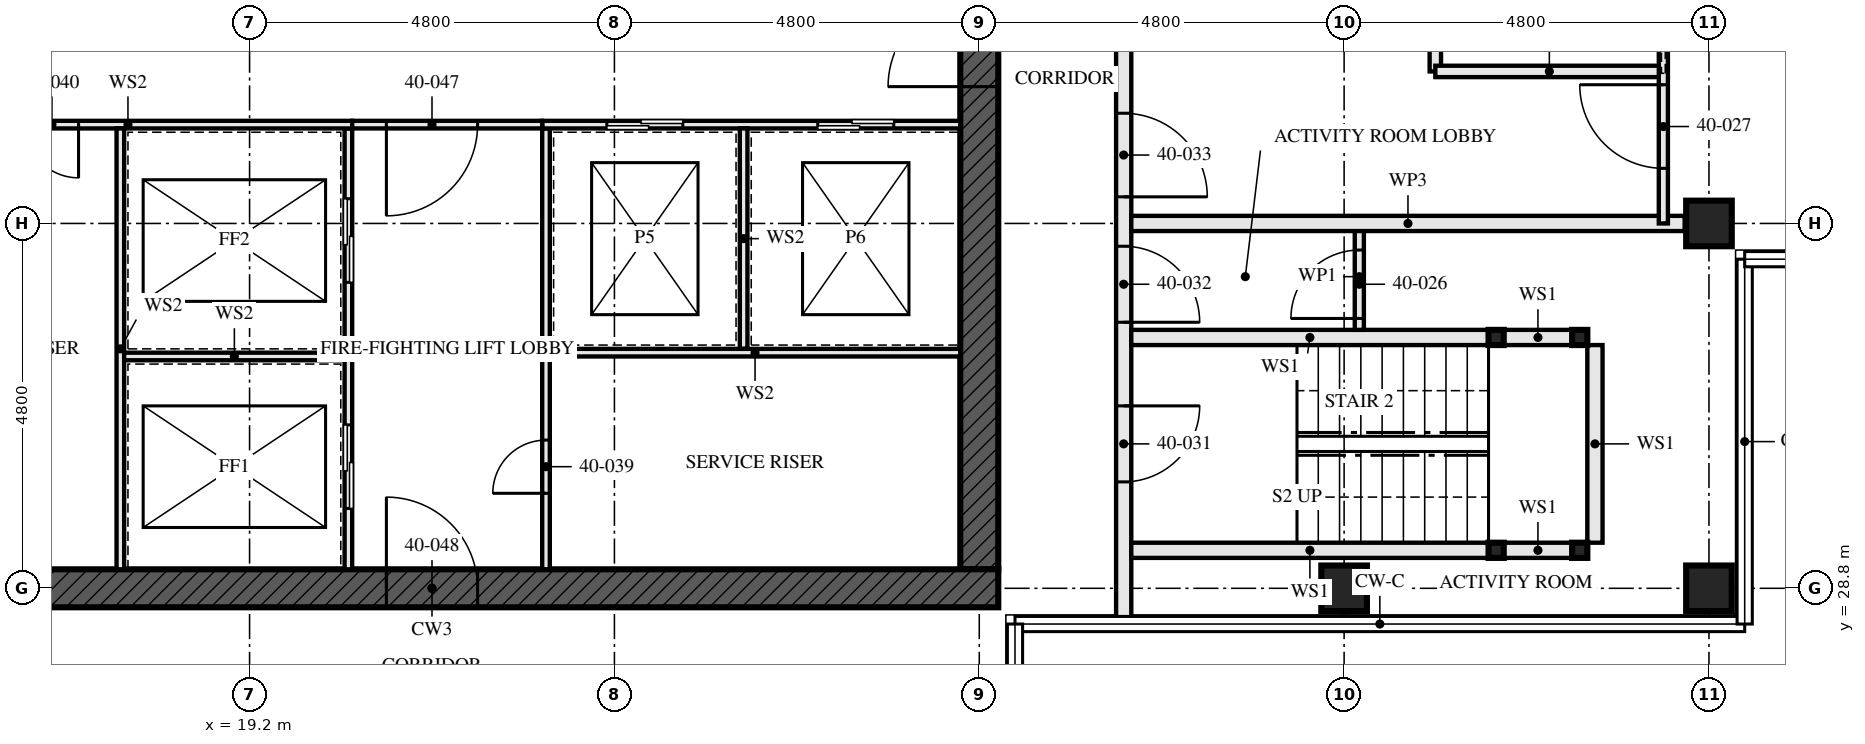
"""IFC4 building model, lengths in metres.
Left out: names, types, materials, properties, quantities, classifications, styles, units other than length and angle.
Written with IfcOpenShell. Run it as: python <this file> out.ifc"""

import sys

from ifc_helpers import new_model, si_unit, direction, frame, frame_2d, origin, origin_2d, place, context, subcontext, project, spatial, rectangle, hollow_rectangle, extrude, element, fill, save


model = new_model("IFC4")
c1 = context("Model", 3, precision=1e-05, world=origin(), true_north=direction((0.0, 1.0)))
c2 = subcontext(c1, "Body", "Model", "MODEL_VIEW")
j1 = project(units=[si_unit("LENGTHUNIT", "METRE"), si_unit("PLANEANGLEUNIT", "RADIAN")], contexts=[c1])
p1 = place(None, origin())
s1 = spatial("IfcSite", under=j1, at=p1, CompositionType="ELEMENT")
p2 = place(p1, origin())
s2 = spatial("IfcBuilding", under=s1, at=p2, CompositionType="ELEMENT")
p3 = place(p2, frame((0.0, 0.0, 148.0)))
s3 = spatial("IfcBuildingStorey", under=s2, at=p3, CompositionType="ELEMENT", Elevation=148.0)
for number, where, z_axis, x_axis in (
    (1, (33.6, 28.8, 0.0), (0.0, 0.0, 1.0), (0.0, 1.0, 0.0)),
    (2, (38.4, 28.8, 0.0), (0.0, 0.0, 1.0), (0.0, 1.0, 0.0)),
    (3, (38.4, 33.6, 0.0), (0.0, 0.0, 1.0), (0.0, 1.0, 0.0)),
):
    element("IfcColumn", number, at=place(p3, frame(where, z_axis=z_axis, x_axis=x_axis)), inside=s3, PredefinedType="COLUMN", context=c2, shape_type="SweptSolid", body=[
        extrude(hollow_rectangle(XDim=0.6, YDim=0.6, WallThickness=0.08, at=origin_2d()), origin(), (0.0, 0.0, 1.0), 3.5),
    ])
p4 = place(p3, frame((14.15, 28.8, -0.17), z_axis=(0.0, 0.0, 1.0), x_axis=(1.0, 0.0, 0.0)))
e4 = element("IfcWall", 4, at=p4, inside=s3, PredefinedType="SHEAR", context=c2, shape_type="SweptSolid", body=[
    extrude(rectangle(XDim=14.9, YDim=0.5, at=frame_2d((7.45, 0.0))), origin(), (0.0, 0.0, 1.0), 3.5),
])
p5 = place(p4, frame((6.85, 0.0, 0.17)))
e5 = element("IfcOpeningElement", 5, at=p5, cuts=e4, PredefinedType="OPENING", context=c2, shape_type="SweptSolid", body=[
    extrude(rectangle(XDim=1.2, YDim=2.1, at=frame_2d((0.6, 1.05))), frame((0.0, 0.26, 0.0), z_axis=(0.0, -1.0, 0.0), x_axis=(1.0, 0.0, 0.0)), (0.0, 0.0, 1.0), 0.521),
])
p6 = place(p3, frame((28.8, 29.05, -0.17), z_axis=(0.0, 0.0, 1.0), x_axis=(0.0, 1.0, 0.0)))
e6 = element("IfcWall", 6, at=p6, inside=s3, PredefinedType="SHEAR", context=c2, shape_type="SweptSolid", body=[
    extrude(rectangle(XDim=13.9, YDim=0.5, at=frame_2d((6.95, 0.0))), origin(), (0.0, 0.0, 1.0), 3.5),
])
p7 = place(p6, frame((6.35, 0.0, 0.17)))
e7 = element("IfcOpeningElement", 7, at=p7, cuts=e6, PredefinedType="OPENING", context=c2, shape_type="SweptSolid", body=[
    extrude(rectangle(XDim=1.2, YDim=2.1, at=frame_2d((0.6, 1.05))), frame((0.0, 0.26, 0.0), z_axis=(0.0, -1.0, 0.0), x_axis=(1.0, 0.0, 0.0)), (0.0, 0.0, 1.0), 0.521),
])
for number, where, z_axis, x_axis in (
    (8, (36.7, 29.3, 0.0), (0.0, 0.0, 1.0), (1.0, 0.0, 0.0)),
    (9, (36.7, 32.1, 0.0), (0.0, 0.0, 1.0), (1.0, 0.0, 0.0)),
    (10, (35.6, 29.3, 0.0), (0.0, 0.0, 1.0), (1.0, 0.0, 0.0)),
    (11, (35.6, 32.1, 0.0), (0.0, 0.0, 1.0), (1.0, 0.0, 0.0)),
):
    element("IfcColumn", number, at=place(p3, frame(where, z_axis=z_axis, x_axis=x_axis)), inside=s3, PredefinedType="COLUMN", context=c2, shape_type="SweptSolid", body=[
        extrude(hollow_rectangle(XDim=0.2, YDim=0.2, WallThickness=0.008, at=origin_2d()), origin(), (0.0, 0.0, 1.0), 3.33),
    ])
p8 = place(p3, frame((36.6, 29.3, 0.0), z_axis=(0.0, 0.0, 1.0), x_axis=(-1.0, 0.0, 0.0)))
e12 = element("IfcWall", 12, at=p8, inside=s3, PredefinedType="SOLIDWALL", context=c2, shape_type="SweptSolid", body=[
    extrude(rectangle(XDim=0.9, YDim=0.2, at=frame_2d((0.45, 0.0))), origin(), (0.0, 0.0, 1.0), 2.99),
])
p9 = place(p3, frame((35.5, 29.3, 0.0), z_axis=(0.0, 0.0, 1.0), x_axis=(-1.0, 0.0, 0.0)))
e13 = element("IfcWall", 13, at=p9, inside=s3, PredefinedType="SOLIDWALL", context=c2, shape_type="SweptSolid", body=[
    extrude(rectangle(XDim=4.7, YDim=0.2, at=frame_2d((2.35, 0.0))), origin(), (0.0, 0.0, 1.0), 2.99),
])
p10 = place(p3, frame((36.6, 32.1, 0.0), z_axis=(0.0, 0.0, 1.0), x_axis=(-1.0, 0.0, 0.0)))
e14 = element("IfcWall", 14, at=p10, inside=s3, PredefinedType="SOLIDWALL", context=c2, shape_type="SweptSolid", body=[
    extrude(rectangle(XDim=0.9, YDim=0.2, at=frame_2d((0.45, 0.0))), origin(), (0.0, 0.0, 1.0), 2.99),
])
p11 = place(p3, frame((35.5, 32.1, 0.0), z_axis=(0.0, 0.0, 1.0), x_axis=(-1.0, 0.0, 0.0)))
e15 = element("IfcWall", 15, at=p11, inside=s3, PredefinedType="SOLIDWALL", context=c2, shape_type="SweptSolid", body=[
    extrude(rectangle(XDim=4.7, YDim=0.2, at=frame_2d((2.35, 0.0))), origin(), (0.0, 0.0, 1.0), 2.99),
])
p12 = place(p3, frame((36.9, 29.4, 0.0), z_axis=(0.0, 0.0, 1.0), x_axis=(0.0, 1.0, 0.0)))
e16 = element("IfcWall", 16, at=p12, inside=s3, PredefinedType="SOLIDWALL", context=c2, shape_type="SweptSolid", body=[
    extrude(rectangle(XDim=2.6, YDim=0.2, at=frame_2d((1.3, 0.0))), origin(), (0.0, 0.0, 1.0), 3.33),
])
p13 = place(p3, frame((33.8, 32.2, 0.0), z_axis=(0.0, 0.0, 1.0), x_axis=(0.0, 1.0, 0.0)))
e17 = element("IfcWall", 17, at=p13, inside=s3, PredefinedType="PARTITIONING", context=c2, shape_type="SweptSolid", body=[
    extrude(rectangle(XDim=1.4, YDim=0.12, at=frame_2d((0.7, 0.0))), origin(), (0.0, 0.0, 1.0), 3.33),
])
p14 = place(p13, frame((0.15, 0.0, 0.0)))
e18 = element("IfcOpeningElement", 18, at=p14, cuts=e17, PredefinedType="OPENING", context=c2, shape_type="SweptSolid", body=[
    extrude(rectangle(XDim=0.9, YDim=2.1, at=frame_2d((0.45, 1.05))), frame((0.0, 0.071, 0.0), z_axis=(0.0, -1.0, 0.0), x_axis=(1.0, 0.0, 0.0)), (0.0, 0.0, 1.0), 0.141),
])
p15 = place(p3, frame((38.08, 33.6, 0.0), z_axis=(0.0, 0.0, 1.0), x_axis=(-1.0, 0.0, 0.0)))
e19 = element("IfcWall", 19, at=p15, inside=s3, PredefinedType="PARTITIONING", context=c2, shape_type="SweptSolid", body=[
    extrude(rectangle(XDim=7.28, YDim=0.2, at=frame_2d((3.64, 0.0))), origin(), (0.0, 0.0, 1.0), 2.55),
])
p16 = place(p3, frame((37.8, 35.6, 0.0), z_axis=(0.0, 0.0, 1.0), x_axis=(-1.0, 0.0, 0.0)))
e20 = element("IfcWall", 20, at=p16, inside=s3, PredefinedType="PARTITIONING", context=c2, shape_type="SweptSolid", body=[
    extrude(rectangle(XDim=3.0, YDim=0.15, at=frame_2d((1.5, 0.0))), origin(), (0.0, 0.0, 1.0), 3.33),
])
p17 = place(p3, frame((34.8, 35.6, 0.0), z_axis=(0.0, 0.0, 1.0), x_axis=(0.0, 1.0, 0.0)))
e21 = element("IfcWall", 21, at=p17, inside=s3, PredefinedType="PARTITIONING", context=c2, shape_type="SweptSolid", body=[
    extrude(rectangle(XDim=2.8, YDim=0.15, at=frame_2d((1.4, 0.0))), origin(), (0.0, 0.0, 1.0), 3.33),
])
p18 = place(p3, frame((37.8, 33.6, 0.0), z_axis=(0.0, 0.0, 1.0), x_axis=(0.0, 1.0, 0.0)))
e22 = element("IfcWall", 22, at=p18, inside=s3, PredefinedType="PARTITIONING", context=c2, shape_type="SweptSolid", body=[
    extrude(rectangle(XDim=4.8, YDim=0.12, at=frame_2d((2.4, 0.0))), origin(), (0.0, 0.0, 1.0), 3.33),
])
p19 = place(p18, frame((0.725, 0.0, 0.0)))
e23 = element("IfcOpeningElement", 23, at=p19, cuts=e22, PredefinedType="OPENING", context=c2, shape_type="SweptSolid", body=[
    extrude(rectangle(XDim=1.1, YDim=2.1, at=frame_2d((0.55, 1.05))), frame((0.0, 0.071, 0.0), z_axis=(0.0, -1.0, 0.0), x_axis=(1.0, 0.0, 0.0)), (0.0, 0.0, 1.0), 0.141),
])
p20 = place(p18, frame((2.925, 0.0, 0.0)))
e24 = element("IfcOpeningElement", 24, at=p20, cuts=e22, PredefinedType="OPENING", context=c2, shape_type="SweptSolid", body=[
    extrude(rectangle(XDim=0.95, YDim=2.1, at=frame_2d((0.475, 1.05))), frame((0.0, 0.071, 0.0), z_axis=(0.0, -1.0, 0.0), x_axis=(1.0, 0.0, 0.0)), (0.0, 0.0, 1.0), 0.141),
])
p21 = place(p3, frame((30.7, 28.35, 0.0), z_axis=(0.0, 0.0, 1.0), x_axis=(0.0, 1.0, 0.0)))
e25 = element("IfcWall", 25, at=p21, inside=s3, PredefinedType="PARTITIONING", context=c2, shape_type="SweptSolid", body=[
    extrude(rectangle(XDim=15.3, YDim=0.2, at=frame_2d((7.65, 0.0))), origin(), (0.0, 0.0, 1.0), 2.32),
])
p22 = place(p21, frame((1.85, 0.0, 0.0)))
e26 = element("IfcOpeningElement", 26, at=p22, cuts=e25, PredefinedType="OPENING", context=c2, shape_type="SweptSolid", body=[
    extrude(rectangle(XDim=1.0, YDim=2.1, at=frame_2d((0.5, 1.05))), frame((0.0, 0.111, 0.0), z_axis=(0.0, -1.0, 0.0), x_axis=(1.0, 0.0, 0.0)), (0.0, 0.0, 1.0), 0.221),
])
p23 = place(p21, frame((3.95, 0.0, 0.0)))
e27 = element("IfcOpeningElement", 27, at=p23, cuts=e25, PredefinedType="OPENING", context=c2, shape_type="SweptSolid", body=[
    extrude(rectangle(XDim=1.0, YDim=2.1, at=frame_2d((0.5, 1.05))), frame((0.0, 0.111, 0.0), z_axis=(0.0, -1.0, 0.0), x_axis=(1.0, 0.0, 0.0)), (0.0, 0.0, 1.0), 0.221),
])
p24 = place(p21, frame((5.6, 0.0, 0.0)))
e28 = element("IfcOpeningElement", 28, at=p24, cuts=e25, PredefinedType="OPENING", context=c2, shape_type="SweptSolid", body=[
    extrude(rectangle(XDim=1.1, YDim=2.1, at=frame_2d((0.55, 1.05))), frame((0.0, 0.111, 0.0), z_axis=(0.0, -1.0, 0.0), x_axis=(1.0, 0.0, 0.0)), (0.0, 0.0, 1.0), 0.221),
])
p25 = place(p21, frame((13.4, 0.0, 0.0)))
e29 = element("IfcOpeningElement", 29, at=p25, cuts=e25, PredefinedType="OPENING", context=c2, shape_type="SweptSolid", body=[
    extrude(rectangle(XDim=1.1, YDim=2.1, at=frame_2d((0.55, 1.05))), frame((0.0, 0.111, 0.0), z_axis=(0.0, -1.0, 0.0), x_axis=(1.0, 0.0, 0.0)), (0.0, 0.0, 1.0), 0.221),
])
p26 = place(p3, frame((20.5, 29.05, 0.0), z_axis=(0.0, 0.0, 1.0), x_axis=(0.0, 1.0, 0.0)))
e30 = element("IfcWall", 30, at=p26, inside=s3, PredefinedType="SOLIDWALL", context=c2, shape_type="SweptSolid", body=[
    extrude(rectangle(XDim=5.8, YDim=0.1, at=frame_2d((2.9, 0.0))), origin(), (0.0, 0.0, 1.0), 3.33),
])
p27 = place(p26, frame((0.8, 0.0, 0.0)))
e31 = element("IfcOpeningElement", 31, at=p27, cuts=e30, PredefinedType="OPENING", context=c2, shape_type="SweptSolid", body=[
    extrude(rectangle(XDim=1.1, YDim=2.3, at=frame_2d((0.55, 1.15))), frame((0.0, 0.061, 0.0), z_axis=(0.0, -1.0, 0.0), x_axis=(1.0, 0.0, 0.0)), (0.0, 0.0, 1.0), 0.121),
])
p28 = place(p26, frame((3.775, 0.0, 0.0)))
e32 = element("IfcOpeningElement", 32, at=p28, cuts=e30, PredefinedType="OPENING", context=c2, shape_type="SweptSolid", body=[
    extrude(rectangle(XDim=1.1, YDim=2.3, at=frame_2d((0.55, 1.15))), frame((0.0, 0.061, 0.0), z_axis=(0.0, -1.0, 0.0), x_axis=(1.0, 0.0, 0.0)), (0.0, 0.0, 1.0), 0.121),
])
p29 = place(p3, frame((23.1, 29.05, 0.0), z_axis=(0.0, 0.0, 1.0), x_axis=(0.0, 1.0, 0.0)))
e33 = element("IfcWall", 33, at=p29, inside=s3, PredefinedType="SOLIDWALL", context=c2, shape_type="SweptSolid", body=[
    extrude(rectangle(XDim=5.8, YDim=0.1, at=frame_2d((2.9, 0.0))), origin(), (0.0, 0.0, 1.0), 3.33),
])
p30 = place(p29, frame((1.0, 0.0, 0.0)))
e34 = element("IfcOpeningElement", 34, at=p30, cuts=e33, PredefinedType="OPENING", context=c2, shape_type="SweptSolid", body=[
    extrude(rectangle(XDim=0.7, YDim=2.1, at=frame_2d((0.35, 1.05))), frame((0.0, 0.061, 0.0), z_axis=(0.0, -1.0, 0.0), x_axis=(1.0, 0.0, 0.0)), (0.0, 0.0, 1.0), 0.121),
])
p31 = place(p3, frame((14.65, 34.9, 0.0), z_axis=(0.0, 0.0, 1.0), x_axis=(1.0, 0.0, 0.0)))
e35 = element("IfcWall", 35, at=p31, inside=s3, PredefinedType="SOLIDWALL", context=c2, shape_type="SweptSolid", body=[
    extrude(rectangle(XDim=5.9, YDim=0.1, at=frame_2d((2.95, 0.0))), origin(), (0.0, 0.0, 1.0), 3.33),
])
p32 = place(p31, frame((1.6, 0.0, 0.0)))
e36 = element("IfcOpeningElement", 36, at=p32, cuts=e35, PredefinedType="OPENING", context=c2, shape_type="SweptSolid", body=[
    extrude(rectangle(XDim=0.7, YDim=2.1, at=frame_2d((0.35, 1.05))), frame((0.0, 0.061, 0.0), z_axis=(0.0, -1.0, 0.0), x_axis=(1.0, 0.0, 0.0)), (0.0, 0.0, 1.0), 0.121),
])
p33 = place(p3, frame((23.05, 34.9, 0.0), z_axis=(0.0, 0.0, 1.0), x_axis=(1.0, 0.0, 0.0)))
e37 = element("IfcWall", 37, at=p33, inside=s3, PredefinedType="SOLIDWALL", context=c2, shape_type="SweptSolid", body=[
    extrude(rectangle(XDim=5.5, YDim=0.1, at=frame_2d((2.75, 0.0))), origin(), (0.0, 0.0, 1.0), 3.33),
])
p34 = place(p33, frame((0.85, 0.0, 0.0)))
e38 = element("IfcOpeningElement", 38, at=p34, cuts=e37, PredefinedType="OPENING", context=c2, shape_type="SweptSolid", body=[
    extrude(rectangle(XDim=1.0, YDim=2.1, at=frame_2d((0.5, 1.05))), frame((0.0, 0.061, 0.0), z_axis=(0.0, -1.0, 0.0), x_axis=(1.0, 0.0, 0.0)), (0.0, 0.0, 1.0), 0.121),
])
p35 = place(p33, frame((3.625, 0.0, 0.0)))
e39 = element("IfcOpeningElement", 39, at=p35, cuts=e37, PredefinedType="OPENING", context=c2, shape_type="SweptSolid", body=[
    extrude(rectangle(XDim=1.0, YDim=2.1, at=frame_2d((0.5, 1.05))), frame((0.0, 0.061, 0.0), z_axis=(0.0, -1.0, 0.0), x_axis=(1.0, 0.0, 0.0)), (0.0, 0.0, 1.0), 0.121),
])
p36 = place(p3, frame((20.55, 34.9, 0.0), z_axis=(0.0, 0.0, 1.0), x_axis=(1.0, 0.0, 0.0)))
e40 = element("IfcWall", 40, at=p36, inside=s3, PredefinedType="SOLIDWALL", context=c2, shape_type="SweptSolid", body=[
    extrude(rectangle(XDim=2.5, YDim=0.1, at=frame_2d((1.25, 0.0))), origin(), (0.0, 0.0, 1.0), 3.33),
])
p37 = place(p36, frame((0.45, 0.0, 0.0)))
e41 = element("IfcOpeningElement", 41, at=p37, cuts=e40, PredefinedType="OPENING", context=c2, shape_type="SweptSolid", body=[
    extrude(rectangle(XDim=1.2, YDim=2.1, at=frame_2d((0.6, 1.05))), frame((0.0, 0.061, 0.0), z_axis=(0.0, -1.0, 0.0), x_axis=(1.0, 0.0, 0.0)), (0.0, 0.0, 1.0), 0.121),
])
p38 = place(p3, frame((17.5, 29.05, 0.0), z_axis=(0.0, 0.0, 1.0), x_axis=(0.0, 1.0, 0.0)))
e42 = element("IfcWall", 42, at=p38, inside=s3, PredefinedType="SOLIDWALL", context=c2, shape_type="SweptSolid", body=[
    extrude(rectangle(XDim=5.8, YDim=0.1, at=frame_2d((2.9, 0.0))), origin(), (0.0, 0.0, 1.0), 3.33),
])
p39 = place(p3, frame((17.55, 31.85, 0.0), z_axis=(0.0, 0.0, 1.0), x_axis=(1.0, 0.0, 0.0)))
e43 = element("IfcWall", 43, at=p39, inside=s3, PredefinedType="SOLIDWALL", context=c2, shape_type="SweptSolid", body=[
    extrude(rectangle(XDim=2.9, YDim=0.1, at=frame_2d((1.45, 0.0))), origin(), (0.0, 0.0, 1.0), 3.33),
])
p40 = place(p3, frame((25.7, 31.95, 0.0), z_axis=(0.0, 0.0, 1.0), x_axis=(0.0, 1.0, 0.0)))
e44 = element("IfcWall", 44, at=p40, inside=s3, PredefinedType="SOLIDWALL", context=c2, shape_type="SweptSolid", body=[
    extrude(rectangle(XDim=2.9, YDim=0.1, at=frame_2d((1.45, 0.0))), origin(), (0.0, 0.0, 1.0), 3.33),
])
p41 = place(p3, frame((23.15, 31.9, 0.0), z_axis=(0.0, 0.0, 1.0), x_axis=(1.0, 0.0, 0.0)))
e45 = element("IfcWall", 45, at=p41, inside=s3, PredefinedType="SOLIDWALL", context=c2, shape_type="SweptSolid", body=[
    extrude(rectangle(XDim=5.4, YDim=0.1, at=frame_2d((2.7, 0.0))), origin(), (0.0, 0.0, 1.0), 3.33),
])
p42 = place(p14, origin())
e46 = element("IfcDoor", 46, at=p42, inside=s3, OperationType="SINGLE_SWING_RIGHT", PredefinedType="DOOR", context=c2, shape_type="SweptSolid", body=[
    extrude(rectangle(XDim=0.9, YDim=2.1, at=frame_2d((0.45, 1.05))), frame((0.0, 0.022, 0.0), z_axis=(0.0, -1.0, 0.0), x_axis=(1.0, 0.0, 0.0)), (0.0, 0.0, 1.0), 0.044),
])
fill(e18, e46)
p43 = place(p19, origin())
e47 = element("IfcDoor", 47, at=p43, inside=s3, OperationType="SINGLE_SWING_LEFT", PredefinedType="DOOR", context=c2, shape_type="SweptSolid", body=[
    extrude(rectangle(XDim=1.1, YDim=2.1, at=frame_2d((0.55, 1.05))), frame((0.0, 0.022, 0.0), z_axis=(0.0, -1.0, 0.0), x_axis=(1.0, 0.0, 0.0)), (0.0, 0.0, 1.0), 0.044),
])
fill(e23, e47)
p44 = place(p22, frame((1.0, 0.0, 0.0), z_axis=(0.0, 0.0, 1.0), x_axis=(-1.0, 0.0, 0.0)))
e48 = element("IfcDoor", 48, at=p44, inside=s3, OperationType="SINGLE_SWING_RIGHT", PredefinedType="DOOR", context=c2, shape_type="SweptSolid", body=[
    extrude(rectangle(XDim=1.0, YDim=2.1, at=frame_2d((0.5, 1.05))), frame((0.0, 0.032, 0.0), z_axis=(0.0, -1.0, 0.0), x_axis=(1.0, 0.0, 0.0)), (0.0, 0.0, 1.0), 0.064),
])
fill(e26, e48)
p45 = place(p23, frame((1.0, 0.0, 0.0), z_axis=(0.0, 0.0, 1.0), x_axis=(-1.0, 0.0, 0.0)))
e49 = element("IfcDoor", 49, at=p45, inside=s3, OperationType="SINGLE_SWING_LEFT", PredefinedType="DOOR", context=c2, shape_type="SweptSolid", body=[
    extrude(rectangle(XDim=1.0, YDim=2.1, at=frame_2d((0.5, 1.05))), frame((0.0, 0.027, 0.0), z_axis=(0.0, -1.0, 0.0), x_axis=(1.0, 0.0, 0.0)), (0.0, 0.0, 1.0), 0.054),
])
fill(e27, e49)
p46 = place(p24, frame((1.1, 0.0, 0.0), z_axis=(0.0, 0.0, 1.0), x_axis=(-1.0, 0.0, 0.0)))
e50 = element("IfcDoor", 50, at=p46, inside=s3, OperationType="SINGLE_SWING_LEFT", PredefinedType="DOOR", context=c2, shape_type="SweptSolid", body=[
    extrude(rectangle(XDim=1.1, YDim=2.1, at=frame_2d((0.55, 1.05))), frame((0.0, 0.027, 0.0), z_axis=(0.0, -1.0, 0.0), x_axis=(1.0, 0.0, 0.0)), (0.0, 0.0, 1.0), 0.054),
])
fill(e28, e50)
p47 = place(p27, origin())
e51 = element("IfcDoor", 51, at=p47, inside=s3, OperationType="SLIDING_TO_LEFT", PredefinedType="DOOR", context=c2, shape_type="SweptSolid", body=[
    extrude(rectangle(XDim=1.1, YDim=2.3, at=frame_2d((0.55, 1.15))), frame((0.0, 0.05, 0.0), z_axis=(0.0, -1.0, 0.0), x_axis=(1.0, 0.0, 0.0)), (0.0, 0.0, 1.0), 0.1),
])
fill(e31, e51)
p48 = place(p28, origin())
e52 = element("IfcDoor", 52, at=p48, inside=s3, OperationType="SLIDING_TO_LEFT", PredefinedType="DOOR", context=c2, shape_type="SweptSolid", body=[
    extrude(rectangle(XDim=1.1, YDim=2.3, at=frame_2d((0.55, 1.15))), frame((0.0, 0.05, 0.0), z_axis=(0.0, -1.0, 0.0), x_axis=(1.0, 0.0, 0.0)), (0.0, 0.0, 1.0), 0.1),
])
fill(e32, e52)
p49 = place(p30, origin())
e53 = element("IfcDoor", 53, at=p49, inside=s3, OperationType="SINGLE_SWING_RIGHT", PredefinedType="DOOR", context=c2, shape_type="SweptSolid", body=[
    extrude(rectangle(XDim=0.7, YDim=2.1, at=frame_2d((0.35, 1.05))), frame((0.0, 0.027, 0.0), z_axis=(0.0, -1.0, 0.0), x_axis=(1.0, 0.0, 0.0)), (0.0, 0.0, 1.0), 0.054),
])
fill(e34, e53)
p50 = place(p32, frame((0.7, 0.0, 0.0), z_axis=(0.0, 0.0, 1.0), x_axis=(-1.0, 0.0, 0.0)))
e54 = element("IfcDoor", 54, at=p50, inside=s3, OperationType="SINGLE_SWING_RIGHT", PredefinedType="DOOR", context=c2, shape_type="SweptSolid", body=[
    extrude(rectangle(XDim=0.7, YDim=2.1, at=frame_2d((0.35, 1.05))), frame((0.0, 0.027, 0.0), z_axis=(0.0, -1.0, 0.0), x_axis=(1.0, 0.0, 0.0)), (0.0, 0.0, 1.0), 0.054),
])
fill(e36, e54)
p51 = place(p34, origin())
e55 = element("IfcDoor", 55, at=p51, inside=s3, OperationType="SLIDING_TO_LEFT", PredefinedType="DOOR", context=c2, shape_type="SweptSolid", body=[
    extrude(rectangle(XDim=1.0, YDim=2.1, at=frame_2d((0.5, 1.05))), frame((0.0, 0.05, 0.0), z_axis=(0.0, -1.0, 0.0), x_axis=(1.0, 0.0, 0.0)), (0.0, 0.0, 1.0), 0.1),
])
fill(e38, e55)
p52 = place(p35, origin())
e56 = element("IfcDoor", 56, at=p52, inside=s3, OperationType="SLIDING_TO_LEFT", PredefinedType="DOOR", context=c2, shape_type="SweptSolid", body=[
    extrude(rectangle(XDim=1.0, YDim=2.1, at=frame_2d((0.5, 1.05))), frame((0.0, 0.05, 0.0), z_axis=(0.0, -1.0, 0.0), x_axis=(1.0, 0.0, 0.0)), (0.0, 0.0, 1.0), 0.1),
])
fill(e39, e56)
p53 = place(p37, frame((1.2, 0.0, 0.0), z_axis=(0.0, 0.0, 1.0), x_axis=(-1.0, 0.0, 0.0)))
e57 = element("IfcDoor", 57, at=p53, inside=s3, OperationType="SINGLE_SWING_LEFT", PredefinedType="DOOR", context=c2, shape_type="SweptSolid", body=[
    extrude(rectangle(XDim=1.2, YDim=2.1, at=frame_2d((0.6, 1.05))), frame((0.0, 0.027, 0.0), z_axis=(0.0, -1.0, 0.0), x_axis=(1.0, 0.0, 0.0)), (0.0, 0.0, 1.0), 0.054),
])
fill(e41, e57)
p54 = place(p5, origin())
e58 = element("IfcDoor", 58, at=p54, inside=s3, OperationType="SINGLE_SWING_LEFT", PredefinedType="DOOR", context=c2, shape_type="SweptSolid", body=[
    extrude(rectangle(XDim=1.2, YDim=2.1, at=frame_2d((0.6, 1.05))), frame((0.0, 0.027, 0.0), z_axis=(0.0, -1.0, 0.0), x_axis=(1.0, 0.0, 0.0)), (0.0, 0.0, 1.0), 0.054),
])
fill(e5, e58)
p55 = place(p7, origin())
e59 = element("IfcDoor", 59, at=p55, inside=s3, OperationType="SINGLE_SWING_LEFT", PredefinedType="DOOR", context=c2, shape_type="SweptSolid", body=[
    extrude(rectangle(XDim=1.2, YDim=2.1, at=frame_2d((0.6, 1.05))), frame((0.0, 0.027, 0.0), z_axis=(0.0, -1.0, 0.0), x_axis=(1.0, 0.0, 0.0)), (0.0, 0.0, 1.0), 0.054),
])
fill(e7, e59)
save(model, sys.argv[1])
